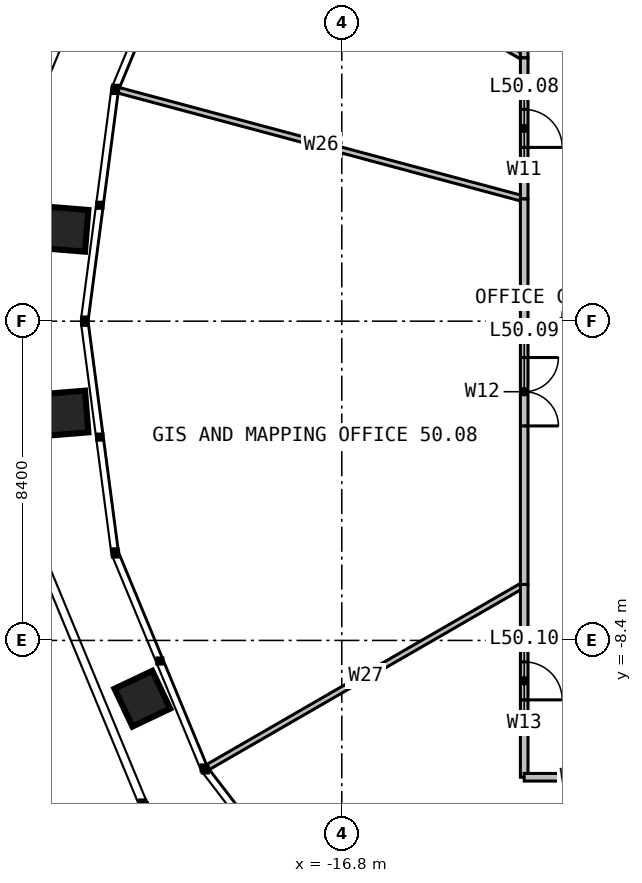
"""IFC4 building model, lengths in metres.
Left out: names, types, materials, properties, quantities, classifications, styles, units other than length and angle.
Written with IfcOpenShell. Run it as: python <this file> out.ifc"""

import sys

from ifc_helpers import new_model, si_unit, direction, frame, frame_2d, origin, place, context, subcontext, project, spatial, rectangle, extrude, element, fill, save


model = new_model("IFC4")
c1 = context("Model", 3, precision=1e-05, world=origin(), true_north=direction((0.0, 1.0)))
c2 = subcontext(c1, "Body", "Model", "MODEL_VIEW")
j1 = project(units=[si_unit("LENGTHUNIT", "METRE"), si_unit("PLANEANGLEUNIT", "RADIAN")], contexts=[c1])
p1 = place(None, origin())
s1 = spatial("IfcSite", under=j1, at=p1, CompositionType="ELEMENT")
p2 = place(p1, origin())
s2 = spatial("IfcBuilding", under=s1, at=p2, CompositionType="ELEMENT")
p3 = place(p2, frame((0.0, 0.0, 207.0)))
s3 = spatial("IfcBuildingStorey", under=s2, at=p3, CompositionType="ELEMENT", Elevation=207.0)
p4 = place(p3, frame((-12.0, 6.928, 0.0), z_axis=(0.0, 0.0, 1.0), x_axis=(-0.866030904871, 0.499990471717, 0.0)))
e1 = element("IfcWall", 1, at=p4, inside=s3, PredefinedType="PARTITIONING", context=c2, shape_type="SweptSolid", body=[
    extrude(rectangle(XDim=9.62, YDim=0.15, at=frame_2d((4.81, 0.0))), origin(), (0.0, 0.0, 1.0), 2.79),
])
p5 = place(p3, frame((-12.0, 3.215, 0.0), z_axis=(0.0, 0.0, 1.0), x_axis=(-0.965922613384, 0.258831035528, 0.0)))
e2 = element("IfcWall", 2, at=p5, inside=s3, PredefinedType="PARTITIONING", context=c2, shape_type="SweptSolid", body=[
    extrude(rectangle(XDim=11.053, YDim=0.15, at=frame_2d((5.526, 0.0))), origin(), (0.0, 0.0, 1.0), 2.79),
])
p6 = place(p3, frame((-12.0, -6.928, 0.0), z_axis=(0.0, 0.0, 1.0), x_axis=(-0.866030904871, -0.499990471717, 0.0)))
e3 = element("IfcWall", 3, at=p6, inside=s3, PredefinedType="PARTITIONING", context=c2, shape_type="SweptSolid", body=[
    extrude(rectangle(XDim=9.62, YDim=0.15, at=frame_2d((4.81, 0.0))), origin(), (0.0, 0.0, 1.0), 2.79),
])
p7 = place(p3, frame((-9.208, -12.0, 0.0), z_axis=(0.0, 0.0, 1.0), x_axis=(-0.608759154628, -0.793355085479, 0.0)))
e4 = element("IfcWall", 4, at=p7, inside=s3, PredefinedType="PARTITIONING", context=c2, shape_type="SweptSolid", body=[
    extrude(rectangle(XDim=8.15, YDim=0.15, at=frame_2d((4.075, 0.0))), origin(), (0.0, 0.0, 1.0), 2.79),
])
p8 = place(p3, frame((-6.928, -12.0, 0.0), z_axis=(0.0, 0.0, 1.0), x_axis=(-0.499990471717, -0.866030904871, 0.0)))
e5 = element("IfcWall", 5, at=p8, inside=s3, PredefinedType="PARTITIONING", context=c2, shape_type="SweptSolid", body=[
    extrude(rectangle(XDim=9.62, YDim=0.15, at=frame_2d((4.81, 0.0))), origin(), (0.0, 0.0, 1.0), 2.79),
])
p9 = place(p3, frame((-12.0, 12.0, 0.0), z_axis=(0.0, 0.0, 1.0), x_axis=(0.0, -1.0, 0.0)))
e6 = element("IfcWall", 6, at=p9, inside=s3, PredefinedType="PARTITIONING", context=c2, shape_type="SweptSolid", body=[
    extrude(rectangle(XDim=5.072, YDim=0.2, at=frame_2d((2.536, 0.0))), origin(), (0.0, 0.0, 1.0), 3.8),
])
p10 = place(p9, frame((2.036, 0.0, 0.0)))
e7 = element("IfcOpeningElement", 7, at=p10, cuts=e6, PredefinedType="OPENING", context=c2, shape_type="SweptSolid", body=[
    extrude(rectangle(XDim=1.0, YDim=2.2, at=frame_2d((0.5, 1.1))), frame((0.0, 0.11, 0.0), z_axis=(0.0, -1.0, 0.0), x_axis=(1.0, 0.0, 0.0)), (0.0, 0.0, 1.0), 0.22),
])
p11 = place(p3, frame((-12.0, 6.928, 0.0), z_axis=(0.0, 0.0, 1.0), x_axis=(0.0, -1.0, 0.0)))
e8 = element("IfcWall", 8, at=p11, inside=s3, PredefinedType="PARTITIONING", context=c2, shape_type="SweptSolid", body=[
    extrude(rectangle(XDim=3.713, YDim=0.2, at=frame_2d((1.856, 0.0))), origin(), (0.0, 0.0, 1.0), 3.8),
])
p12 = place(p11, frame((1.356, 0.0, 0.0)))
e9 = element("IfcOpeningElement", 9, at=p12, cuts=e8, PredefinedType="OPENING", context=c2, shape_type="SweptSolid", body=[
    extrude(rectangle(XDim=1.0, YDim=2.2, at=frame_2d((0.5, 1.1))), frame((0.0, 0.11, 0.0), z_axis=(0.0, -1.0, 0.0), x_axis=(1.0, 0.0, 0.0)), (0.0, 0.0, 1.0), 0.22),
])
p13 = place(p3, frame((-12.0, 3.215, 0.0), z_axis=(0.0, 0.0, 1.0), x_axis=(0.0, -1.0, 0.0)))
e10 = element("IfcWall", 10, at=p13, inside=s3, PredefinedType="PARTITIONING", context=c2, shape_type="SweptSolid", body=[
    extrude(rectangle(XDim=10.144, YDim=0.2, at=frame_2d((5.072, 0.0))), origin(), (0.0, 0.0, 1.0), 3.8),
])
p14 = place(p13, frame((4.172, 0.0, 0.0)))
e11 = element("IfcOpeningElement", 11, at=p14, cuts=e10, PredefinedType="OPENING", context=c2, shape_type="SweptSolid", body=[
    extrude(rectangle(XDim=1.8, YDim=2.2, at=frame_2d((0.9, 1.1))), frame((0.0, 0.11, 0.0), z_axis=(0.0, -1.0, 0.0), x_axis=(1.0, 0.0, 0.0)), (0.0, 0.0, 1.0), 0.22),
])
p15 = place(p3, frame((-12.0, -6.928, 0.0), z_axis=(0.0, 0.0, 1.0), x_axis=(0.0, -1.0, 0.0)))
e12 = element("IfcWall", 12, at=p15, inside=s3, PredefinedType="PARTITIONING", context=c2, shape_type="SweptSolid", body=[
    extrude(rectangle(XDim=5.072, YDim=0.2, at=frame_2d((2.536, 0.0))), origin(), (0.0, 0.0, 1.0), 3.8),
])
p16 = place(p15, frame((2.036, 0.0, 0.0)))
e13 = element("IfcOpeningElement", 13, at=p16, cuts=e12, PredefinedType="OPENING", context=c2, shape_type="SweptSolid", body=[
    extrude(rectangle(XDim=1.0, YDim=2.2, at=frame_2d((0.5, 1.1))), frame((0.0, 0.11, 0.0), z_axis=(0.0, -1.0, 0.0), x_axis=(1.0, 0.0, 0.0)), (0.0, 0.0, 1.0), 0.22),
])
p17 = place(p3, frame((-12.0, -12.0, 0.0), z_axis=(0.0, 0.0, 1.0), x_axis=(1.0, 0.0, 0.0)))
e14 = element("IfcWall", 14, at=p17, inside=s3, PredefinedType="PARTITIONING", context=c2, shape_type="SweptSolid", body=[
    extrude(rectangle(XDim=2.792, YDim=0.2, at=frame_2d((1.396, 0.0))), origin(), (0.0, 0.0, 1.0), 3.8),
])
p18 = place(p12, origin())
e15 = element("IfcDoor", 15, at=p18, inside=s3, OperationType="SINGLE_SWING_RIGHT", PredefinedType="DOOR", context=c2, shape_type="SweptSolid", body=[
    extrude(rectangle(XDim=1.0, YDim=2.2, at=frame_2d((0.5, 1.1))), frame((0.0, 0.025, 0.0), z_axis=(0.0, -1.0, 0.0), x_axis=(1.0, 0.0, 0.0)), (0.0, 0.0, 1.0), 0.05),
])
fill(e9, e15)
p19 = place(p14, origin())
e16 = element("IfcDoor", 16, at=p19, inside=s3, OperationType="DOUBLE_DOOR_SINGLE_SWING", PredefinedType="DOOR", context=c2, shape_type="SweptSolid", body=[
    extrude(rectangle(XDim=1.8, YDim=2.2, at=frame_2d((0.9, 1.1))), frame((0.0, 0.025, 0.0), z_axis=(0.0, -1.0, 0.0), x_axis=(1.0, 0.0, 0.0)), (0.0, 0.0, 1.0), 0.05),
])
fill(e11, e16)
p20 = place(p16, origin())
e17 = element("IfcDoor", 17, at=p20, inside=s3, OperationType="SINGLE_SWING_RIGHT", PredefinedType="DOOR", context=c2, shape_type="SweptSolid", body=[
    extrude(rectangle(XDim=1.0, YDim=2.2, at=frame_2d((0.5, 1.1))), frame((0.0, 0.025, 0.0), z_axis=(0.0, -1.0, 0.0), x_axis=(1.0, 0.0, 0.0)), (0.0, 0.0, 1.0), 0.05),
])
fill(e13, e17)
save(model, sys.argv[1])
